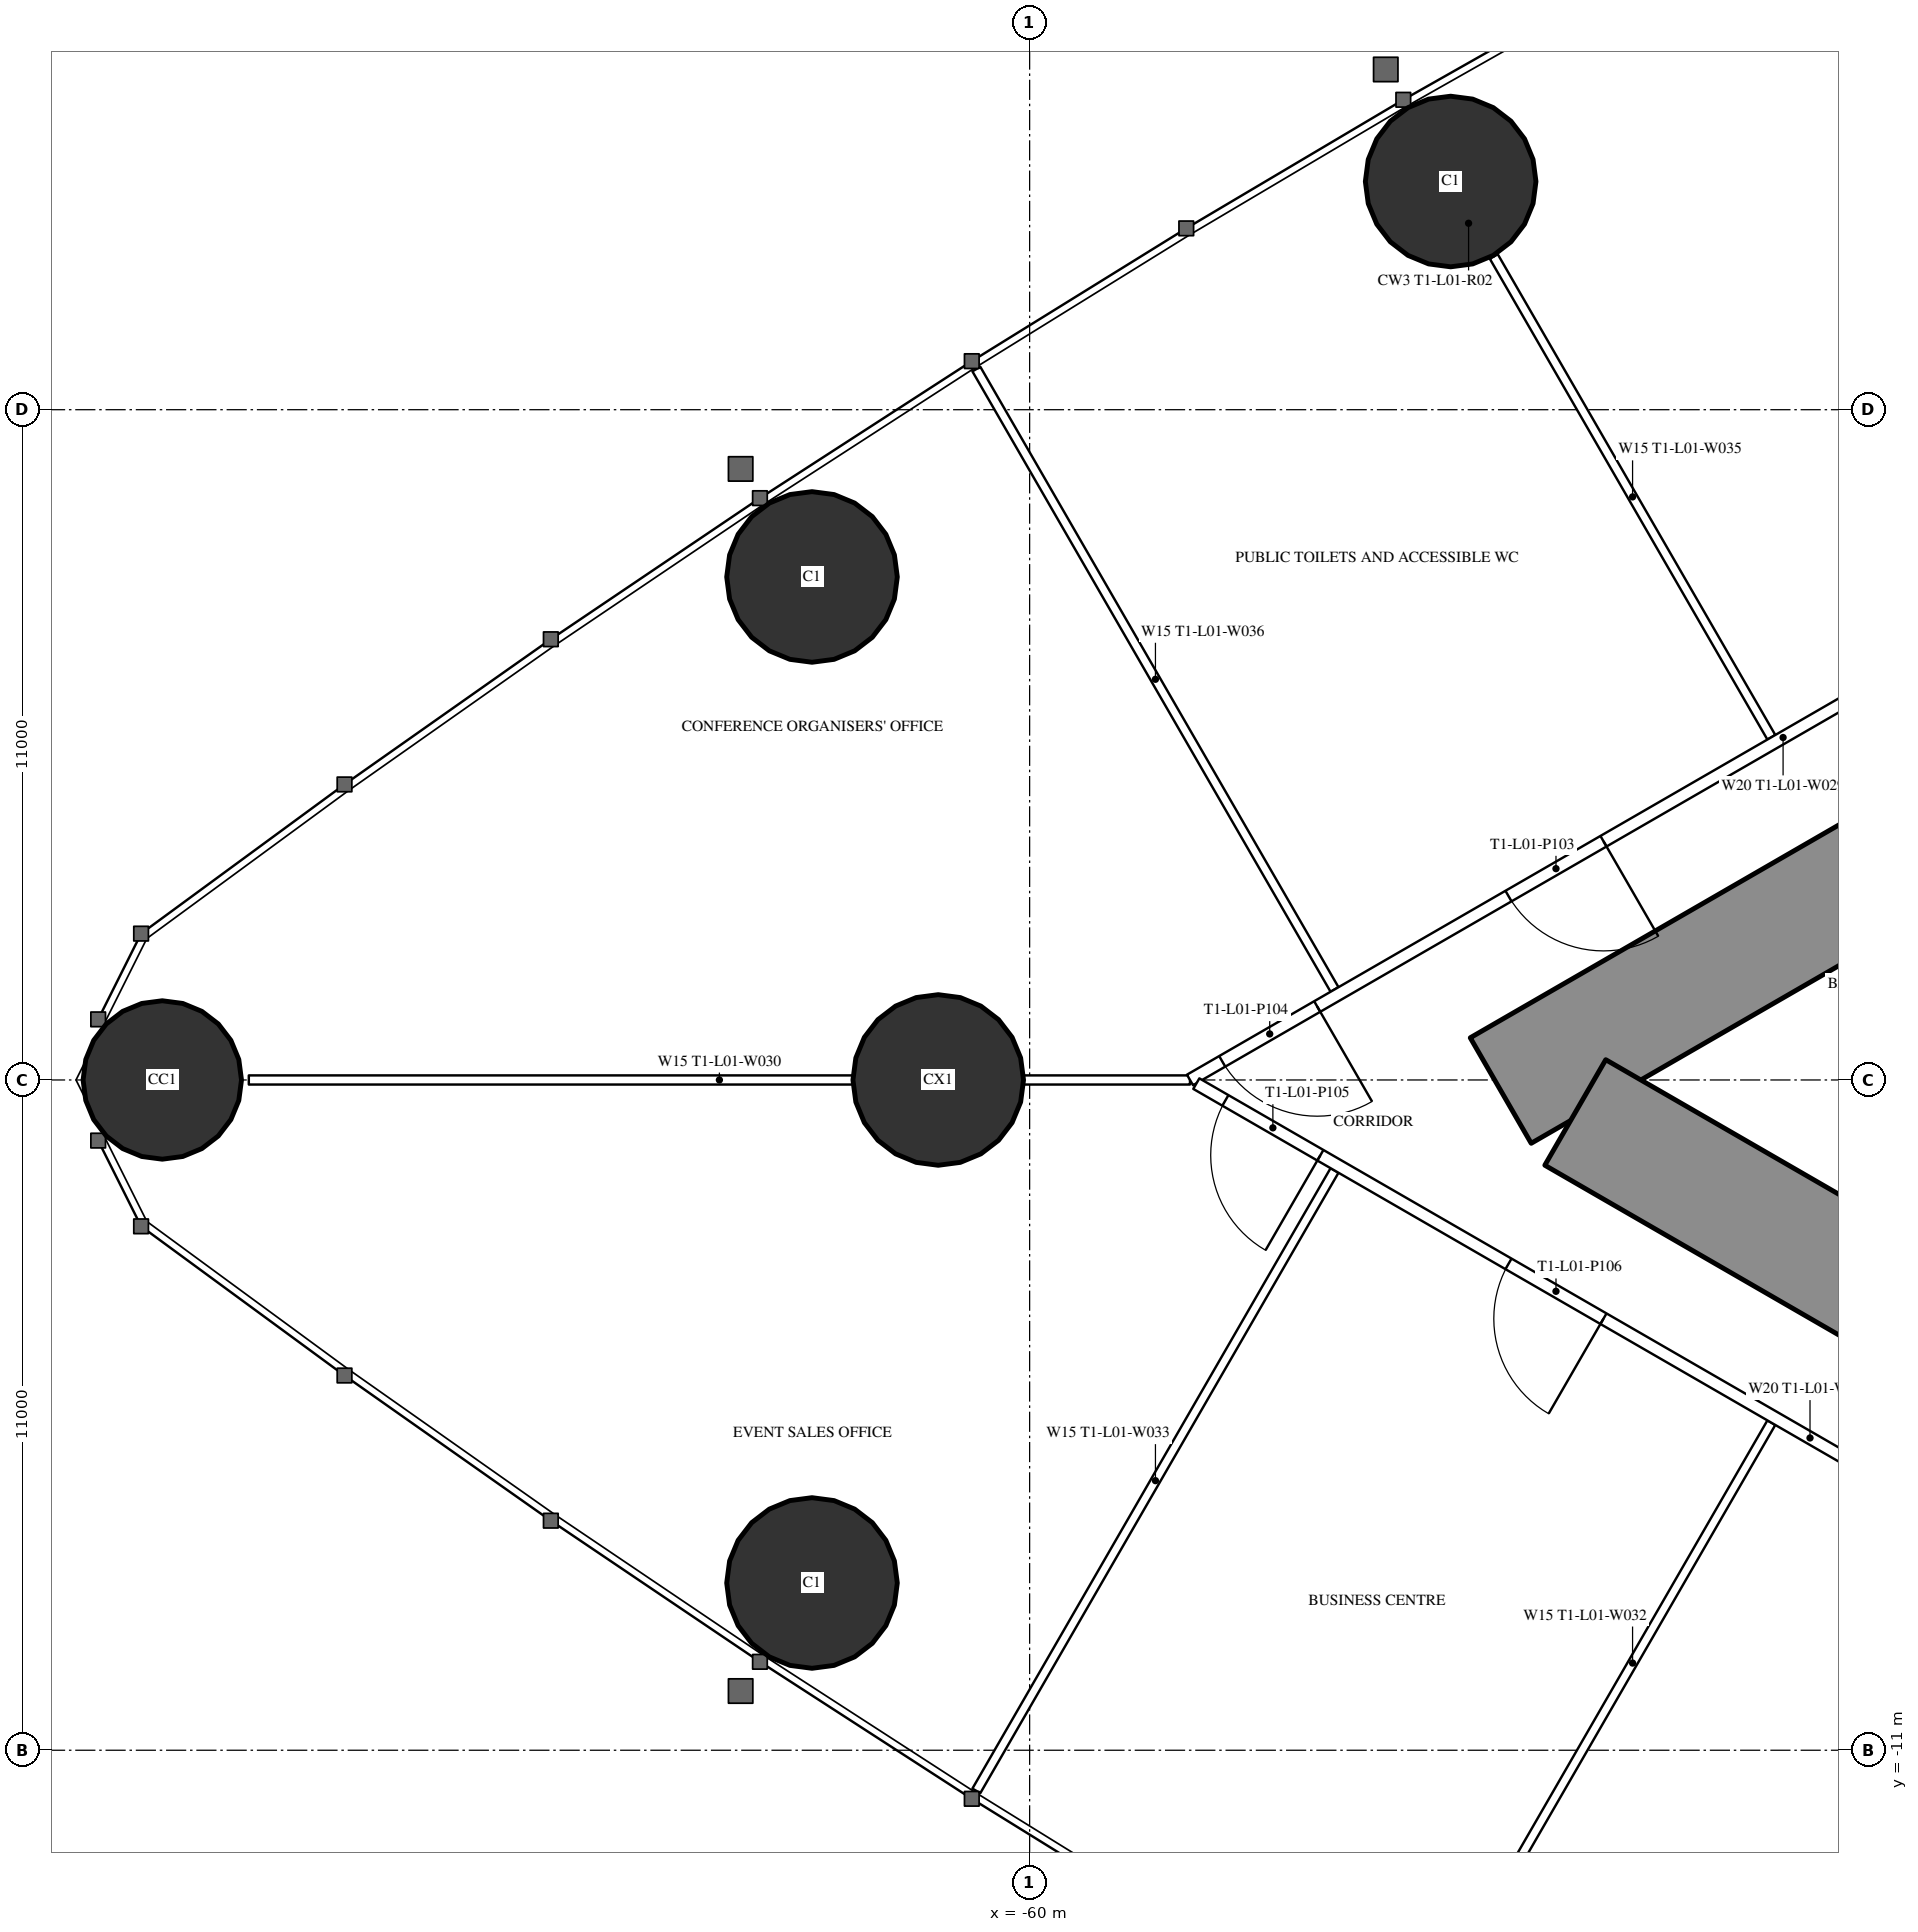
"""IFC4 building model, lengths in metres.
Left out: names, types, materials, properties, quantities, classifications, styles, units other than length and angle.
Written with IfcOpenShell. Run it as: python <this file> out.ifc"""

import sys

from ifc_helpers import new_model, si_unit, direction, frame, frame_2d, origin, origin_2d, place, context, subcontext, project, spatial, rectangle, hollow_circle, extrude, element, fill, save


model = new_model("IFC4")
c1 = context("Model", 3, precision=1e-05, world=origin(), true_north=direction((0.0, 1.0)))
c2 = subcontext(c1, "Body", "Model", "MODEL_VIEW")
j1 = project(units=[si_unit("LENGTHUNIT", "METRE"), si_unit("PLANEANGLEUNIT", "RADIAN")], contexts=[c1])
p1 = place(None, origin())
s1 = spatial("IfcSite", under=j1, at=p1, CompositionType="ELEMENT")
p2 = place(p1, origin())
s2 = spatial("IfcBuilding", under=s1, at=p2, CompositionType="ELEMENT")
p3 = place(p2, frame((0.0, 0.0, 7.2)))
s3 = spatial("IfcBuildingStorey", under=s2, at=p3, CompositionType="ELEMENT", Elevation=7.2)
p4 = place(p3, frame((-74.235, 0.0, 0.0), z_axis=(0.0, 0.0, 1.0), x_axis=(1.0, 0.0, 0.0)))
e1 = element("IfcColumn", 1, at=p4, inside=s3, PredefinedType="COLUMN", context=c2, shape_type="SweptSolid", body=[
    extrude(hollow_circle(Radius=1.3, WallThickness=0.1, at=origin_2d()), origin(), (0.0, 0.0, 1.0), 5.4),
])
for number, where, z_axis, x_axis in (
    (2, (-63.572, -8.255, 0.0), (0.0, 0.0, 1.0), (1.0, 0.0, 0.0)),
    (3, (-53.09, 14.745, 0.0), (0.0, 0.0, 1.0), (1.0, 0.0, 0.0)),
    (4, (-63.572, 8.255, 0.0), (0.0, 0.0, 1.0), (1.0, 0.0, 0.0)),
):
    element("IfcColumn", number, at=place(p3, frame(where, z_axis=z_axis, x_axis=x_axis)), inside=s3, PredefinedType="COLUMN", context=c2, shape_type="SweptSolid", body=[
        extrude(hollow_circle(Radius=1.4, WallThickness=0.12, at=origin_2d()), origin(), (0.0, 0.0, 1.0), 5.4),
    ])
p5 = place(p3, frame((-61.5, 0.0, 0.0), z_axis=(0.0, 0.0, 1.0), x_axis=(1.0, 0.0, 0.0)))
e5 = element("IfcColumn", 5, at=p5, inside=s3, PredefinedType="COLUMN", context=c2, shape_type="SweptSolid", body=[
    extrude(hollow_circle(Radius=1.4, WallThickness=0.1, at=origin_2d()), origin(), (0.0, 0.0, 1.0), 5.4),
])
p6 = place(p3, frame((-27.2, 14.3, 0.0), z_axis=(0.0, 0.0, 1.0), x_axis=(-0.866026593062, -0.499997940104, 0.0)))
e6 = element("IfcWall", 6, at=p6, inside=s3, PredefinedType="SHEAR", context=c2, shape_type="SweptSolid", body=[
    extrude(rectangle(XDim=28.946, YDim=2.0, at=frame_2d((14.473, 0.0))), origin(), (0.0, 0.0, 1.0), 5.4),
])
p7 = place(p6, frame((4.6, 0.0, 0.0)))
e7 = element("IfcOpeningElement", 7, at=p7, cuts=e6, PredefinedType="OPENING", context=c2, shape_type="SweptSolid", body=[
    extrude(rectangle(XDim=1.0, YDim=2.2, at=frame_2d((0.5, 1.1))), frame((0.0, 1.01, 0.0), z_axis=(0.0, -1.0, 0.0), x_axis=(1.0, 0.0, 0.0)), (0.0, 0.0, 1.0), 2.02),
])
p8 = place(p6, frame((13.395, 0.0, 0.0)))
e8 = element("IfcOpeningElement", 8, at=p8, cuts=e6, PredefinedType="OPENING", context=c2, shape_type="SweptSolid", body=[
    extrude(rectangle(XDim=1.8, YDim=2.2, at=frame_2d((0.9, 1.1))), frame((0.0, 1.01, 0.0), z_axis=(0.0, -1.0, 0.0), x_axis=(1.0, 0.0, 0.0)), (0.0, 0.0, 1.0), 2.02),
])
p9 = place(p3, frame((-27.2, -14.3, 0.0), z_axis=(0.0, 0.0, 1.0), x_axis=(-0.866024044937, 0.500002353585, 0.0)))
e9 = element("IfcWall", 9, at=p9, inside=s3, PredefinedType="SHEAR", context=c2, shape_type="SweptSolid", body=[
    extrude(rectangle(XDim=27.533, YDim=2.0, at=frame_2d((13.767, 0.0))), origin(), (0.0, 0.0, 1.0), 5.4),
])
p10 = place(p9, frame((4.6, 0.0, 0.0)))
e10 = element("IfcOpeningElement", 10, at=p10, cuts=e9, PredefinedType="OPENING", context=c2, shape_type="SweptSolid", body=[
    extrude(rectangle(XDim=1.0, YDim=2.2, at=frame_2d((0.5, 1.1))), frame((0.0, 1.01, 0.0), z_axis=(0.0, -1.0, 0.0), x_axis=(1.0, 0.0, 0.0)), (0.0, 0.0, 1.0), 2.02),
])
p11 = place(p9, frame((13.395, 0.0, 0.0)))
e11 = element("IfcOpeningElement", 11, at=p11, cuts=e9, PredefinedType="OPENING", context=c2, shape_type="SweptSolid", body=[
    extrude(rectangle(XDim=1.8, YDim=2.2, at=frame_2d((0.9, 1.1))), frame((0.0, 1.01, 0.0), z_axis=(0.0, -1.0, 0.0), x_axis=(1.0, 0.0, 0.0)), (0.0, 0.0, 1.0), 2.02),
])
p12 = place(p3, frame((-47.827, 5.624, 0.0), z_axis=(0.0, 0.0, 1.0), x_axis=(-0.499995404498, 0.866028056982, 0.0)))
e12 = element("IfcWall", 12, at=p12, inside=s3, PredefinedType="PARTITIONING", context=c2, shape_type="SweptSolid", body=[
    extrude(rectangle(XDim=9.11, YDim=0.15, at=frame_2d((4.555, 0.0))), origin(), (0.0, 0.0, 1.0), 4.05),
])
p13 = place(p3, frame((-54.996, 1.485, 0.0), z_axis=(0.0, 0.0, 1.0), x_axis=(-0.500002871521, 0.866023745905, 0.0)))
e13 = element("IfcWall", 13, at=p13, inside=s3, PredefinedType="PARTITIONING", context=c2, shape_type="SweptSolid", body=[
    extrude(rectangle(XDim=11.757, YDim=0.15, at=frame_2d((5.878, 0.0))), origin(), (0.0, 0.0, 1.0), 5.05),
])
p14 = place(p3, frame((-47.827, -5.624, 0.0), z_axis=(0.0, 0.0, 1.0), x_axis=(-0.499995404498, -0.866028056982, 0.0)))
e14 = element("IfcWall", 14, at=p14, inside=s3, PredefinedType="PARTITIONING", context=c2, shape_type="SweptSolid", body=[
    extrude(rectangle(XDim=9.11, YDim=0.15, at=frame_2d((4.555, 0.0))), origin(), (0.0, 0.0, 1.0), 4.05),
])
p15 = place(p3, frame((-54.996, -1.485, 0.0), z_axis=(0.0, 0.0, 1.0), x_axis=(-0.500002871521, -0.866023745905, 0.0)))
e15 = element("IfcWall", 15, at=p15, inside=s3, PredefinedType="PARTITIONING", context=c2, shape_type="SweptSolid", body=[
    extrude(rectangle(XDim=11.757, YDim=0.15, at=frame_2d((5.878, 0.0))), origin(), (0.0, 0.0, 1.0), 5.05),
])
p16 = place(p3, frame((-57.368, 0.0, 0.0), z_axis=(0.0, 0.0, 1.0), x_axis=(-1.0, 0.0, 0.0)))
e16 = element("IfcWall", 16, at=p16, inside=s3, PredefinedType="PARTITIONING", context=c2, shape_type="SweptSolid", body=[
    extrude(rectangle(XDim=15.447, YDim=0.15, at=frame_2d((7.724, 0.0))), origin(), (0.0, 0.0, 1.0), 4.05),
])
p17 = place(p3, frame((-37.9, 11.24, 0.0), z_axis=(0.0, 0.0, 1.0), x_axis=(-0.866022995118, -0.50000417191, 0.0)))
e17 = element("IfcWall", 17, at=p17, inside=s3, PredefinedType="PARTITIONING", context=c2, shape_type="SweptSolid", body=[
    extrude(rectangle(XDim=22.48, YDim=0.2, at=frame_2d((11.24, 0.0))), origin(), (0.0, 0.0, 1.0), 5.05),
])
p18 = place(p17, frame((14.644, 0.0, 0.0)))
e18 = element("IfcOpeningElement", 18, at=p18, cuts=e17, PredefinedType="OPENING", context=c2, shape_type="SweptSolid", body=[
    extrude(rectangle(XDim=1.8, YDim=2.2, at=frame_2d((0.9, 1.1))), frame((0.0, 0.11, 0.0), z_axis=(0.0, -1.0, 0.0), x_axis=(1.0, 0.0, 0.0)), (0.0, 0.0, 1.0), 0.22),
])
p19 = place(p17, frame((20.069, 0.0, 0.0)))
e19 = element("IfcOpeningElement", 19, at=p19, cuts=e17, PredefinedType="OPENING", context=c2, shape_type="SweptSolid", body=[
    extrude(rectangle(XDim=1.8, YDim=2.2, at=frame_2d((0.9, 1.1))), frame((0.0, 0.11, 0.0), z_axis=(0.0, -1.0, 0.0), x_axis=(1.0, 0.0, 0.0)), (0.0, 0.0, 1.0), 0.22),
])
p20 = place(p17, frame((4.915, 0.0, 0.0)))
e20 = element("IfcOpeningElement", 20, at=p20, cuts=e17, PredefinedType="OPENING", context=c2, shape_type="SweptSolid", body=[
    extrude(rectangle(XDim=1.8, YDim=2.2, at=frame_2d((0.9, 1.1))), frame((0.0, 0.11, 0.0), z_axis=(0.0, -1.0, 0.0), x_axis=(1.0, 0.0, 0.0)), (0.0, 0.0, 1.0), 0.22),
])
p21 = place(p3, frame((-37.12, -11.69, 0.0), z_axis=(0.0, 0.0, 1.0), x_axis=(-0.866028803602, 0.499994111297, 0.0)))
e21 = element("IfcWall", 21, at=p21, inside=s3, PredefinedType="PARTITIONING", context=c2, shape_type="SweptSolid", body=[
    extrude(rectangle(XDim=23.26, YDim=0.2, at=frame_2d((11.63, 0.0))), origin(), (0.0, 0.0, 1.0), 5.05),
])
p22 = place(p21, frame((20.909, 0.0, 0.0)))
e22 = element("IfcOpeningElement", 22, at=p22, cuts=e21, PredefinedType="OPENING", context=c2, shape_type="SweptSolid", body=[
    extrude(rectangle(XDim=1.8, YDim=2.2, at=frame_2d((0.9, 1.1))), frame((0.0, 0.11, 0.0), z_axis=(0.0, -1.0, 0.0), x_axis=(1.0, 0.0, 0.0)), (0.0, 0.0, 1.0), 0.22),
])
p23 = place(p21, frame((15.544, 0.0, 0.0)))
e23 = element("IfcOpeningElement", 23, at=p23, cuts=e21, PredefinedType="OPENING", context=c2, shape_type="SweptSolid", body=[
    extrude(rectangle(XDim=1.8, YDim=2.2, at=frame_2d((0.9, 1.1))), frame((0.0, 0.11, 0.0), z_axis=(0.0, -1.0, 0.0), x_axis=(1.0, 0.0, 0.0)), (0.0, 0.0, 1.0), 0.22),
])
p24 = place(p21, frame((5.365, 0.0, 0.0)))
e24 = element("IfcOpeningElement", 24, at=p24, cuts=e21, PredefinedType="OPENING", context=c2, shape_type="SweptSolid", body=[
    extrude(rectangle(XDim=1.8, YDim=2.2, at=frame_2d((0.9, 1.1))), frame((0.0, 0.11, 0.0), z_axis=(0.0, -1.0, 0.0), x_axis=(1.0, 0.0, 0.0)), (0.0, 0.0, 1.0), 0.22),
])
p25 = place(p18, origin())
e25 = element("IfcDoor", 25, at=p25, inside=s3, OperationType="DOUBLE_DOOR_SINGLE_SWING", PredefinedType="DOOR", context=c2, shape_type="SweptSolid", body=[
    extrude(rectangle(XDim=1.8, YDim=2.2, at=frame_2d((0.9, 1.1))), frame((0.0, 0.025, 0.0), z_axis=(0.0, -1.0, 0.0), x_axis=(1.0, 0.0, 0.0)), (0.0, 0.0, 1.0), 0.05),
])
fill(e18, e25)
p26 = place(p19, origin())
e26 = element("IfcDoor", 26, at=p26, inside=s3, OperationType="DOUBLE_DOOR_SINGLE_SWING", PredefinedType="DOOR", context=c2, shape_type="SweptSolid", body=[
    extrude(rectangle(XDim=1.8, YDim=2.2, at=frame_2d((0.9, 1.1))), frame((0.0, 0.025, 0.0), z_axis=(0.0, -1.0, 0.0), x_axis=(1.0, 0.0, 0.0)), (0.0, 0.0, 1.0), 0.05),
])
fill(e19, e26)
p27 = place(p22, origin())
e27 = element("IfcDoor", 27, at=p27, inside=s3, OperationType="DOUBLE_DOOR_SINGLE_SWING", PredefinedType="DOOR", context=c2, shape_type="SweptSolid", body=[
    extrude(rectangle(XDim=1.8, YDim=2.2, at=frame_2d((0.9, 1.1))), frame((0.0, 0.025, 0.0), z_axis=(0.0, -1.0, 0.0), x_axis=(1.0, 0.0, 0.0)), (0.0, 0.0, 1.0), 0.05),
])
fill(e22, e27)
p28 = place(p23, origin())
e28 = element("IfcDoor", 28, at=p28, inside=s3, OperationType="DOUBLE_DOOR_SINGLE_SWING", PredefinedType="DOOR", context=c2, shape_type="SweptSolid", body=[
    extrude(rectangle(XDim=1.8, YDim=2.2, at=frame_2d((0.9, 1.1))), frame((0.0, 0.025, 0.0), z_axis=(0.0, -1.0, 0.0), x_axis=(1.0, 0.0, 0.0)), (0.0, 0.0, 1.0), 0.05),
])
fill(e23, e28)
save(model, sys.argv[1])
